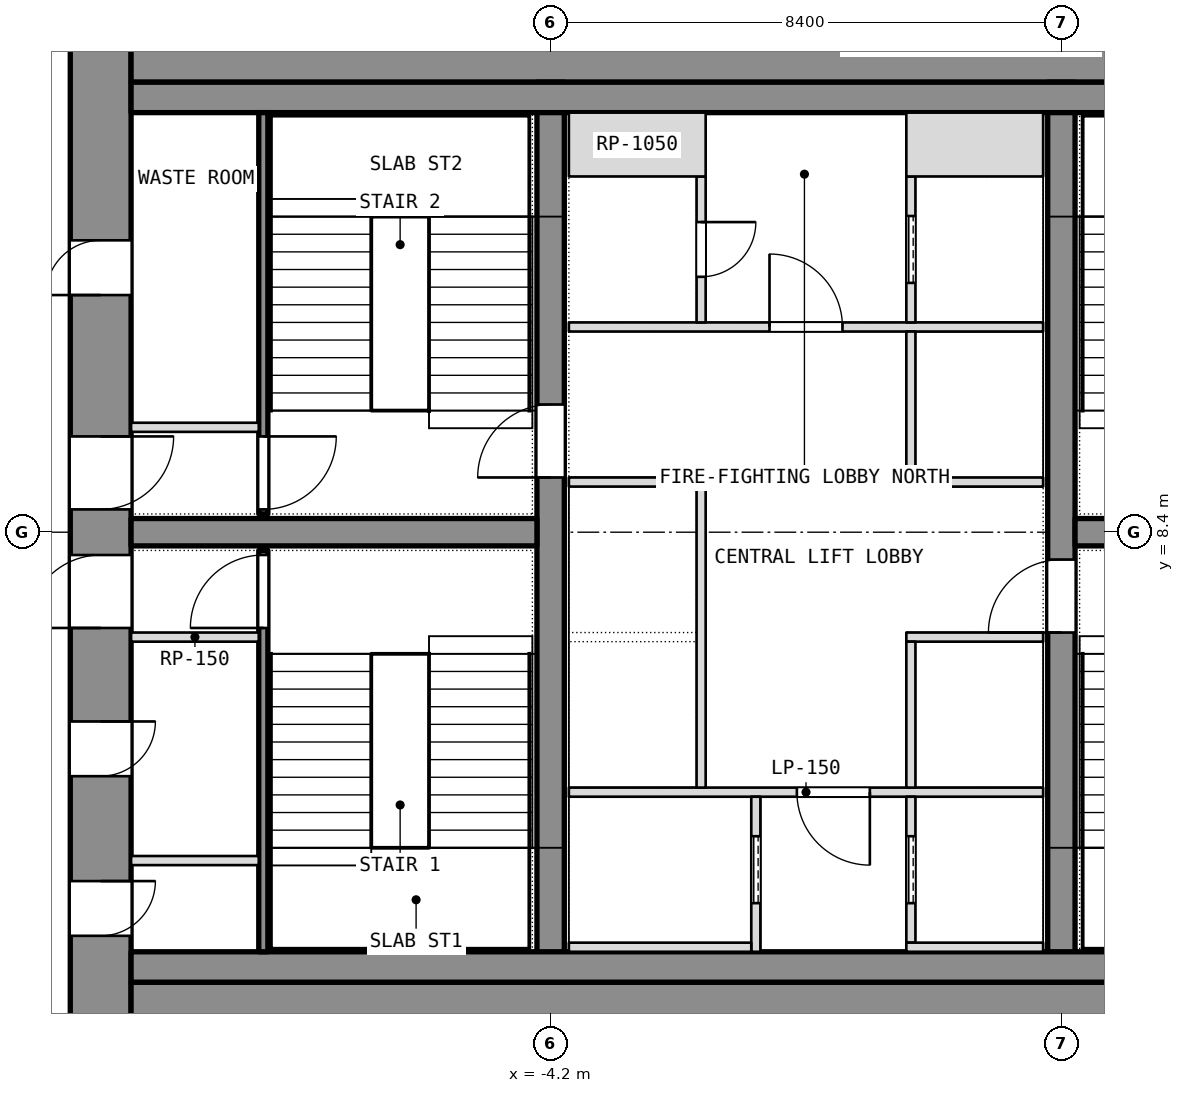
"""IFC4 building model, lengths in metres.
Left out: names, types, materials, properties, quantities, classifications, styles, units other than length and angle.
Written with IfcOpenShell. Run it as: python <this file> out.ifc"""

import sys

from ifc_helpers import new_model, si_unit, direction, frame, frame_2d, origin, place, context, subcontext, project, spatial, rectangle, extrude, element, fill, save


model = new_model("IFC4")
c1 = context("Model", 3, precision=1e-05, world=origin(), true_north=direction((0.0, 1.0)))
c2 = subcontext(c1, "Body", "Model", "MODEL_VIEW")
j1 = project(units=[si_unit("LENGTHUNIT", "METRE"), si_unit("PLANEANGLEUNIT", "RADIAN")], contexts=[c1])
p1 = place(None, origin())
s1 = spatial("IfcSite", under=j1, at=p1, CompositionType="ELEMENT")
p2 = place(p1, origin())
s2 = spatial("IfcBuilding", under=s1, at=p2, CompositionType="ELEMENT")
p3 = place(p2, frame((0.0, 0.0, 112.1)))
s3 = spatial("IfcBuildingStorey", under=s2, at=p3, CompositionType="ELEMENT", Elevation=112.1)
p4 = place(p3, frame((-11.6, 0.0, 0.0), z_axis=(0.0, 0.0, 1.0), x_axis=(0.0, 1.0, 0.0)))
e1 = element("IfcWall", 1, at=p4, inside=s3, PredefinedType="SHEAR", context=c2, shape_type="SweptSolid", body=[
    extrude(rectangle(XDim=16.8, YDim=1.0, at=frame_2d((8.4, 0.0))), origin(), (0.0, 0.0, 1.0), 3.6),
])
p5 = place(p4, frame((1.762, 0.0, 0.0)))
e2 = element("IfcOpeningElement", 2, at=p5, cuts=e1, PredefinedType="OPENING", context=c2, shape_type="SweptSolid", body=[
    extrude(rectangle(XDim=0.9, YDim=2.1, at=frame_2d((0.45, 1.05))), frame((0.0, 0.5, 0.0), z_axis=(0.0, -1.0, 0.0), x_axis=(1.0, 0.0, 0.0)), (0.0, 0.0, 1.0), 1.0),
])
p6 = place(p4, frame((4.387, 0.0, 0.0)))
e3 = element("IfcOpeningElement", 3, at=p6, cuts=e1, PredefinedType="OPENING", context=c2, shape_type="SweptSolid", body=[
    extrude(rectangle(XDim=0.9, YDim=2.1, at=frame_2d((0.45, 1.05))), frame((0.0, 0.5, 0.0), z_axis=(0.0, -1.0, 0.0), x_axis=(1.0, 0.0, 0.0)), (0.0, 0.0, 1.0), 1.0),
])
p7 = place(p4, frame((6.825, 0.0, 0.0)))
e4 = element("IfcOpeningElement", 4, at=p7, cuts=e1, PredefinedType="OPENING", context=c2, shape_type="SweptSolid", body=[
    extrude(rectangle(XDim=1.2, YDim=2.1, at=frame_2d((0.6, 1.05))), frame((0.0, 0.5, 0.0), z_axis=(0.0, -1.0, 0.0), x_axis=(1.0, 0.0, 0.0)), (0.0, 0.0, 1.0), 1.0),
])
p8 = place(p4, frame((12.3, 0.0, 0.0)))
e5 = element("IfcOpeningElement", 5, at=p8, cuts=e1, PredefinedType="OPENING", context=c2, shape_type="SweptSolid", body=[
    extrude(rectangle(XDim=0.9, YDim=2.1, at=frame_2d((0.45, 1.05))), frame((0.0, 0.5, 0.0), z_axis=(0.0, -1.0, 0.0), x_axis=(1.0, 0.0, 0.0)), (0.0, 0.0, 1.0), 1.0),
])
p9 = place(p4, frame((8.775, 0.0, 0.0)))
e6 = element("IfcOpeningElement", 6, at=p9, cuts=e1, PredefinedType="OPENING", context=c2, shape_type="SweptSolid", body=[
    extrude(rectangle(XDim=1.2, YDim=2.1, at=frame_2d((0.6, 1.05))), frame((0.0, 0.5, 0.0), z_axis=(0.0, -1.0, 0.0), x_axis=(1.0, 0.0, 0.0)), (0.0, 0.0, 1.0), 1.0),
])
for number, where, z_axis, x_axis in (
    (7, (-11.1, 0.5, 0.0), (0.0, 0.0, 1.0), (1.0, 0.0, 0.0)),
    (8, (-11.1, 16.3, 0.0), (0.0, 0.0, 1.0), (1.0, 0.0, 0.0)),
):
    element("IfcWall", number, at=place(p3, frame(where, z_axis=z_axis, x_axis=x_axis)), inside=s3, PredefinedType="SHEAR", context=c2, shape_type="SweptSolid", body=[
        extrude(rectangle(XDim=22.2, YDim=1.0, at=frame_2d((11.1, 0.0))), origin(), (0.0, 0.0, 1.0), 3.6),
    ])
p10 = place(p3, frame((-4.2, 1.0, 0.0), z_axis=(0.0, 0.0, 1.0), x_axis=(0.0, 1.0, 0.0)))
e9 = element("IfcWall", 9, at=p10, inside=s3, PredefinedType="SHEAR", context=c2, shape_type="SweptSolid", body=[
    extrude(rectangle(XDim=14.8, YDim=0.45, at=frame_2d((7.4, 0.0))), origin(), (0.0, 0.0, 1.0), 3.6),
])
p11 = place(p10, frame((8.3, 0.0, 0.0)))
e10 = element("IfcOpeningElement", 10, at=p11, cuts=e9, PredefinedType="OPENING", context=c2, shape_type="SweptSolid", body=[
    extrude(rectangle(XDim=1.2, YDim=2.1, at=frame_2d((0.6, 1.05))), frame((0.0, 0.225, 0.0), z_axis=(0.0, -1.0, 0.0), x_axis=(1.0, 0.0, 0.0)), (0.0, 0.0, 1.0), 0.45),
])
p12 = place(p3, frame((4.2, 1.0, 0.0), z_axis=(0.0, 0.0, 1.0), x_axis=(0.0, 1.0, 0.0)))
e11 = element("IfcWall", 11, at=p12, inside=s3, PredefinedType="SHEAR", context=c2, shape_type="SweptSolid", body=[
    extrude(rectangle(XDim=14.8, YDim=0.45, at=frame_2d((7.4, 0.0))), origin(), (0.0, 0.0, 1.0), 3.6),
])
p13 = place(p12, frame((5.75, 0.0, 0.0)))
e12 = element("IfcOpeningElement", 12, at=p13, cuts=e11, PredefinedType="OPENING", context=c2, shape_type="SweptSolid", body=[
    extrude(rectangle(XDim=1.2, YDim=2.1, at=frame_2d((0.6, 1.05))), frame((0.0, 0.225, 0.0), z_axis=(0.0, -1.0, 0.0), x_axis=(1.0, 0.0, 0.0)), (0.0, 0.0, 1.0), 0.45),
])
for number, where, z_axis, x_axis in (
    (13, (-11.1, 8.4, 0.0), (0.0, 0.0, 1.0), (1.0, 0.0, 0.0)),
    (14, (4.425, 8.4, 0.0), (0.0, 0.0, 1.0), (1.0, 0.0, 0.0)),
):
    element("IfcWall", number, at=place(p3, frame(where, z_axis=z_axis, x_axis=x_axis)), inside=s3, PredefinedType="SHEAR", context=c2, shape_type="SweptSolid", body=[
        extrude(rectangle(XDim=6.675, YDim=0.45, at=frame_2d((3.337, 0.0))), origin(), (0.0, 0.0, 1.0), 3.6),
    ])
for number, where, z_axis, x_axis in (
    (15, (-11.1, 1.25, 0.0), (0.0, 0.0, 1.0), (1.0, 0.0, 0.0)),
    (16, (-11.1, 15.55, 0.0), (0.0, 0.0, 1.0), (1.0, 0.0, 0.0)),
):
    element("IfcWall", number, at=place(p3, frame(where, z_axis=z_axis, x_axis=x_axis)), inside=s3, PredefinedType="PARTITIONING", context=c2, shape_type="SweptSolid", body=[
        extrude(rectangle(XDim=22.2, YDim=0.5, at=frame_2d((11.1, 0.0))), origin(), (0.0, 0.0, 1.0), 3.34),
    ])
p14 = place(p3, frame((-8.925, 1.5, 0.0), z_axis=(0.0, 0.0, 1.0), x_axis=(0.0, 1.0, 0.0)))
e17 = element("IfcWall", 17, at=p14, inside=s3, PredefinedType="SHEAR", context=c2, shape_type="SweptSolid", body=[
    extrude(rectangle(XDim=6.6, YDim=0.15, at=frame_2d((3.3, 0.0))), origin(), (0.0, 0.0, 1.0), 3.34),
])
p15 = place(p14, frame((5.325, 0.0, 0.0)))
e18 = element("IfcOpeningElement", 18, at=p15, cuts=e17, PredefinedType="OPENING", context=c2, shape_type="SweptSolid", body=[
    extrude(rectangle(XDim=1.2, YDim=2.1, at=frame_2d((0.6, 1.05))), frame((0.0, 0.075, 0.0), z_axis=(0.0, -1.0, 0.0), x_axis=(1.0, 0.0, 0.0)), (0.0, 0.0, 1.0), 0.15),
])
for number, where, z_axis, x_axis in (
    (19, (-11.1, 6.675, 0.0), (0.0, 0.0, 1.0), (1.0, 0.0, 0.0)),
    (20, (-11.1, 3.0, 0.0), (0.0, 0.0, 1.0), (1.0, 0.0, 0.0)),
):
    element("IfcWall", number, at=place(p3, frame(where, z_axis=z_axis, x_axis=x_axis)), inside=s3, PredefinedType="PARTITIONING", context=c2, shape_type="SweptSolid", body=[
        extrude(rectangle(XDim=2.1, YDim=0.15, at=frame_2d((1.05, 0.0))), origin(), (0.0, 0.0, 1.0), 3.34),
    ])
p16 = place(p3, frame((-8.925, 8.7, 0.0), z_axis=(0.0, 0.0, 1.0), x_axis=(0.0, 1.0, 0.0)))
e21 = element("IfcWall", 21, at=p16, inside=s3, PredefinedType="SHEAR", context=c2, shape_type="SweptSolid", body=[
    extrude(rectangle(XDim=6.6, YDim=0.15, at=frame_2d((3.3, 0.0))), origin(), (0.0, 0.0, 1.0), 3.34),
])
p17 = place(p16, frame((0.075, 0.0, 0.0)))
e22 = element("IfcOpeningElement", 22, at=p17, cuts=e21, PredefinedType="OPENING", context=c2, shape_type="SweptSolid", body=[
    extrude(rectangle(XDim=1.2, YDim=2.1, at=frame_2d((0.6, 1.05))), frame((0.0, 0.075, 0.0), z_axis=(0.0, -1.0, 0.0), x_axis=(1.0, 0.0, 0.0)), (0.0, 0.0, 1.0), 0.15),
])
p18 = place(p3, frame((-11.1, 10.125, 0.0), z_axis=(0.0, 0.0, 1.0), x_axis=(1.0, 0.0, 0.0)))
e23 = element("IfcWall", 23, at=p18, inside=s3, PredefinedType="PARTITIONING", context=c2, shape_type="SweptSolid", body=[
    extrude(rectangle(XDim=2.1, YDim=0.15, at=frame_2d((1.05, 0.0))), origin(), (0.0, 0.0, 1.0), 3.34),
])
p19 = place(p3, frame((-3.9, 4.125, 0.0), z_axis=(0.0, 0.0, 1.0), x_axis=(1.0, 0.0, 0.0)))
e24 = element("IfcWall", 24, at=p19, inside=s3, PredefinedType="PARTITIONING", context=c2, shape_type="SweptSolid", body=[
    extrude(rectangle(XDim=7.8, YDim=0.15, at=frame_2d((3.9, 0.0))), origin(), (0.0, 0.0, 1.0), 3.34),
])
p20 = place(p19, frame((3.75, 0.0, 0.0)))
e25 = element("IfcOpeningElement", 25, at=p20, cuts=e24, PredefinedType="OPENING", context=c2, shape_type="SweptSolid", body=[
    extrude(rectangle(XDim=1.2, YDim=2.1, at=frame_2d((0.6, 1.05))), frame((0.0, 0.075, 0.0), z_axis=(0.0, -1.0, 0.0), x_axis=(1.0, 0.0, 0.0)), (0.0, 0.0, 1.0), 0.15),
])
p21 = place(p3, frame((-3.9, 11.775, 0.0), z_axis=(0.0, 0.0, 1.0), x_axis=(1.0, 0.0, 0.0)))
e26 = element("IfcWall", 26, at=p21, inside=s3, PredefinedType="PARTITIONING", context=c2, shape_type="SweptSolid", body=[
    extrude(rectangle(XDim=7.8, YDim=0.15, at=frame_2d((3.9, 0.0))), origin(), (0.0, 0.0, 1.0), 3.34),
])
p22 = place(p21, frame((3.3, 0.0, 0.0)))
e27 = element("IfcOpeningElement", 27, at=p22, cuts=e26, PredefinedType="OPENING", context=c2, shape_type="SweptSolid", body=[
    extrude(rectangle(XDim=1.2, YDim=2.1, at=frame_2d((0.6, 1.05))), frame((0.0, 0.075, 0.0), z_axis=(0.0, -1.0, 0.0), x_axis=(1.0, 0.0, 0.0)), (0.0, 0.0, 1.0), 0.15),
])
p23 = place(p3, frame((-0.825, 1.5, 0.0), z_axis=(0.0, 0.0, 1.0), x_axis=(0.0, 1.0, 0.0)))
e28 = element("IfcWall", 28, at=p23, inside=s3, PredefinedType="SHEAR", context=c2, shape_type="SweptSolid", body=[
    extrude(rectangle(XDim=2.55, YDim=0.15, at=frame_2d((1.275, 0.0))), origin(), (0.0, 0.0, 1.0), 3.6),
])
p24 = place(p23, frame((0.8, 0.0, 0.0)))
e29 = element("IfcOpeningElement", 29, at=p24, cuts=e28, PredefinedType="OPENING", context=c2, shape_type="SweptSolid", body=[
    extrude(rectangle(XDim=1.1, YDim=2.1, at=frame_2d((0.55, 1.05))), frame((0.0, 0.075, 0.0), z_axis=(0.0, -1.0, 0.0), x_axis=(1.0, 0.0, 0.0)), (0.0, 0.0, 1.0), 0.15),
])
p25 = place(p3, frame((-3.9, 1.575, 0.0), z_axis=(0.0, 0.0, 1.0), x_axis=(1.0, 0.0, 0.0)))
e30 = element("IfcWall", 30, at=p25, inside=s3, PredefinedType="SHEAR", context=c2, shape_type="SweptSolid", body=[
    extrude(rectangle(XDim=3.0, YDim=0.15, at=frame_2d((1.5, 0.0))), origin(), (0.0, 0.0, 1.0), 3.6),
])
p26 = place(p3, frame((-1.725, 4.2, 0.0), z_axis=(0.0, 0.0, 1.0), x_axis=(0.0, 1.0, 0.0)))
e31 = element("IfcWall", 31, at=p26, inside=s3, PredefinedType="SHEAR", context=c2, shape_type="SweptSolid", body=[
    extrude(rectangle(XDim=4.95, YDim=0.15, at=frame_2d((2.475, 0.0))), origin(), (0.0, 0.0, 1.0), 3.6),
])
p27 = place(p3, frame((-3.9, 9.225, 0.0), z_axis=(0.0, 0.0, 1.0), x_axis=(1.0, 0.0, 0.0)))
e32 = element("IfcWall", 32, at=p27, inside=s3, PredefinedType="SHEAR", context=c2, shape_type="SweptSolid", body=[
    extrude(rectangle(XDim=2.25, YDim=0.15, at=frame_2d((1.125, 0.0))), origin(), (0.0, 0.0, 1.0), 3.6),
])
p28 = place(p3, frame((-1.725, 11.85, 0.0), z_axis=(0.0, 0.0, 1.0), x_axis=(0.0, 1.0, 0.0)))
e33 = element("IfcWall", 33, at=p28, inside=s3, PredefinedType="PARTITIONING", context=c2, shape_type="SweptSolid", body=[
    extrude(rectangle(XDim=2.4, YDim=0.15, at=frame_2d((1.2, 0.0))), origin(), (0.0, 0.0, 1.0), 3.34),
])
p29 = place(p28, frame((0.75, 0.0, 0.0)))
e34 = element("IfcOpeningElement", 34, at=p29, cuts=e33, PredefinedType="OPENING", context=c2, shape_type="SweptSolid", body=[
    extrude(rectangle(XDim=0.9, YDim=2.1, at=frame_2d((0.45, 1.05))), frame((0.0, 0.075, 0.0), z_axis=(0.0, -1.0, 0.0), x_axis=(1.0, 0.0, 0.0)), (0.0, 0.0, 1.0), 0.15),
])
p30 = place(p3, frame((-3.9, 14.775, 0.0), z_axis=(0.0, 0.0, 1.0), x_axis=(1.0, 0.0, 0.0)))
e35 = element("IfcWall", 35, at=p30, inside=s3, PredefinedType="PARTITIONING", context=c2, shape_type="SweptSolid", body=[
    extrude(rectangle(XDim=2.25, YDim=1.05, at=frame_2d((1.125, 0.0))), origin(), (0.0, 0.0, 1.0), 3.34),
])
p31 = place(p3, frame((1.725, 1.65, 0.0), z_axis=(0.0, 0.0, 1.0), x_axis=(0.0, 1.0, 0.0)))
e36 = element("IfcWall", 36, at=p31, inside=s3, PredefinedType="SHEAR", context=c2, shape_type="SweptSolid", body=[
    extrude(rectangle(XDim=2.4, YDim=0.15, at=frame_2d((1.2, 0.0))), origin(), (0.0, 0.0, 1.0), 3.6),
])
p32 = place(p31, frame((0.65, 0.0, 0.0)))
e37 = element("IfcOpeningElement", 37, at=p32, cuts=e36, PredefinedType="OPENING", context=c2, shape_type="SweptSolid", body=[
    extrude(rectangle(XDim=1.1, YDim=2.1, at=frame_2d((0.55, 1.05))), frame((0.0, 0.075, 0.0), z_axis=(0.0, -1.0, 0.0), x_axis=(1.0, 0.0, 0.0)), (0.0, 0.0, 1.0), 0.15),
])
p33 = place(p3, frame((1.65, 1.575, 0.0), z_axis=(0.0, 0.0, 1.0), x_axis=(1.0, 0.0, 0.0)))
e38 = element("IfcWall", 38, at=p33, inside=s3, PredefinedType="SHEAR", context=c2, shape_type="SweptSolid", body=[
    extrude(rectangle(XDim=2.25, YDim=0.15, at=frame_2d((1.125, 0.0))), origin(), (0.0, 0.0, 1.0), 3.6),
])
p34 = place(p3, frame((1.725, 11.85, 0.0), z_axis=(0.0, 0.0, 1.0), x_axis=(0.0, 1.0, 0.0)))
e39 = element("IfcWall", 39, at=p34, inside=s3, PredefinedType="SHEAR", context=c2, shape_type="SweptSolid", body=[
    extrude(rectangle(XDim=2.4, YDim=0.15, at=frame_2d((1.2, 0.0))), origin(), (0.0, 0.0, 1.0), 3.6),
])
p35 = place(p34, frame((0.65, 0.0, 0.0)))
e40 = element("IfcOpeningElement", 40, at=p35, cuts=e39, PredefinedType="OPENING", context=c2, shape_type="SweptSolid", body=[
    extrude(rectangle(XDim=1.1, YDim=2.1, at=frame_2d((0.55, 1.05))), frame((0.0, 0.075, 0.0), z_axis=(0.0, -1.0, 0.0), x_axis=(1.0, 0.0, 0.0)), (0.0, 0.0, 1.0), 0.15),
])
p36 = place(p3, frame((1.65, 14.775, 0.0), z_axis=(0.0, 0.0, 1.0), x_axis=(1.0, 0.0, 0.0)))
e41 = element("IfcWall", 41, at=p36, inside=s3, PredefinedType="SHEAR", context=c2, shape_type="SweptSolid", body=[
    extrude(rectangle(XDim=2.25, YDim=1.05, at=frame_2d((1.125, 0.0))), origin(), (0.0, 0.0, 1.0), 3.6),
])
for number, where, z_axis, x_axis in (
    (42, (1.65, 6.675, 0.0), (0.0, 0.0, 1.0), (1.0, 0.0, 0.0)),
    (43, (1.65, 9.225, 0.0), (0.0, 0.0, 1.0), (1.0, 0.0, 0.0)),
):
    element("IfcWall", number, at=place(p3, frame(where, z_axis=z_axis, x_axis=x_axis)), inside=s3, PredefinedType="SHEAR", context=c2, shape_type="SweptSolid", body=[
        extrude(rectangle(XDim=2.25, YDim=0.15, at=frame_2d((1.125, 0.0))), origin(), (0.0, 0.0, 1.0), 3.6),
    ])
p37 = place(p3, frame((1.725, 4.2, 0.0), z_axis=(0.0, 0.0, 1.0), x_axis=(0.0, 1.0, 0.0)))
e44 = element("IfcWall", 44, at=p37, inside=s3, PredefinedType="SHEAR", context=c2, shape_type="SweptSolid", body=[
    extrude(rectangle(XDim=2.4, YDim=0.15, at=frame_2d((1.2, 0.0))), origin(), (0.0, 0.0, 1.0), 3.6),
])
p38 = place(p3, frame((1.725, 9.3, 0.0), z_axis=(0.0, 0.0, 1.0), x_axis=(0.0, 1.0, 0.0)))
e45 = element("IfcWall", 45, at=p38, inside=s3, PredefinedType="SHEAR", context=c2, shape_type="SweptSolid", body=[
    extrude(rectangle(XDim=2.4, YDim=0.15, at=frame_2d((1.2, 0.0))), origin(), (0.0, 0.0, 1.0), 3.6),
])
p39 = place(p5, origin())
e46 = element("IfcDoor", 46, at=p39, inside=s3, OperationType="SINGLE_SWING_LEFT", PredefinedType="DOOR", context=c2, shape_type="SweptSolid", body=[
    extrude(rectangle(XDim=0.9, YDim=2.1, at=frame_2d((0.45, 1.05))), frame((0.0, 0.025, 0.0), z_axis=(0.0, -1.0, 0.0), x_axis=(1.0, 0.0, 0.0)), (0.0, 0.0, 1.0), 0.05),
])
fill(e2, e46)
p40 = place(p6, origin())
e47 = element("IfcDoor", 47, at=p40, inside=s3, OperationType="SINGLE_SWING_LEFT", PredefinedType="DOOR", context=c2, shape_type="SweptSolid", body=[
    extrude(rectangle(XDim=0.9, YDim=2.1, at=frame_2d((0.45, 1.05))), frame((0.0, 0.025, 0.0), z_axis=(0.0, -1.0, 0.0), x_axis=(1.0, 0.0, 0.0)), (0.0, 0.0, 1.0), 0.05),
])
fill(e3, e47)
p41 = place(p7, origin())
e48 = element("IfcDoor", 48, at=p41, inside=s3, OperationType="SINGLE_SWING_LEFT", PredefinedType="DOOR", context=c2, shape_type="SweptSolid", body=[
    extrude(rectangle(XDim=1.2, YDim=2.1, at=frame_2d((0.6, 1.05))), frame((0.0, 0.025, 0.0), z_axis=(0.0, -1.0, 0.0), x_axis=(1.0, 0.0, 0.0)), (0.0, 0.0, 1.0), 0.05),
])
fill(e4, e48)
p42 = place(p15, origin())
e49 = element("IfcDoor", 49, at=p42, inside=s3, OperationType="SINGLE_SWING_LEFT", PredefinedType="DOOR", context=c2, shape_type="SweptSolid", body=[
    extrude(rectangle(XDim=1.2, YDim=2.1, at=frame_2d((0.6, 1.05))), frame((0.0, 0.025, 0.0), z_axis=(0.0, -1.0, 0.0), x_axis=(1.0, 0.0, 0.0)), (0.0, 0.0, 1.0), 0.05),
])
fill(e18, e49)
p43 = place(p8, origin())
e50 = element("IfcDoor", 50, at=p43, inside=s3, OperationType="SINGLE_SWING_LEFT", PredefinedType="DOOR", context=c2, shape_type="SweptSolid", body=[
    extrude(rectangle(XDim=0.9, YDim=2.1, at=frame_2d((0.45, 1.05))), frame((0.0, 0.025, 0.0), z_axis=(0.0, -1.0, 0.0), x_axis=(1.0, 0.0, 0.0)), (0.0, 0.0, 1.0), 0.05),
])
fill(e5, e50)
p44 = place(p9, origin())
e51 = element("IfcDoor", 51, at=p44, inside=s3, OperationType="SINGLE_SWING_LEFT", PredefinedType="DOOR", context=c2, shape_type="SweptSolid", body=[
    extrude(rectangle(XDim=1.2, YDim=2.1, at=frame_2d((0.6, 1.05))), frame((0.0, 0.025, 0.0), z_axis=(0.0, -1.0, 0.0), x_axis=(1.0, 0.0, 0.0)), (0.0, 0.0, 1.0), 0.05),
])
fill(e6, e51)
p45 = place(p17, origin())
e52 = element("IfcDoor", 52, at=p45, inside=s3, OperationType="SINGLE_SWING_LEFT", PredefinedType="DOOR", context=c2, shape_type="SweptSolid", body=[
    extrude(rectangle(XDim=1.2, YDim=2.1, at=frame_2d((0.6, 1.05))), frame((0.0, 0.025, 0.0), z_axis=(0.0, -1.0, 0.0), x_axis=(1.0, 0.0, 0.0)), (0.0, 0.0, 1.0), 0.05),
])
fill(e22, e52)
p46 = place(p24, origin())
e53 = element("IfcDoor", 53, at=p46, inside=s3, OperationType="SLIDING_TO_LEFT", PredefinedType="DOOR", context=c2, shape_type="SweptSolid", body=[
    extrude(rectangle(XDim=1.1, YDim=2.1, at=frame_2d((0.55, 1.05))), frame((0.0, 0.025, 0.0), z_axis=(0.0, -1.0, 0.0), x_axis=(1.0, 0.0, 0.0)), (0.0, 0.0, 1.0), 0.05),
])
fill(e29, e53)
p47 = place(p32, origin())
e54 = element("IfcDoor", 54, at=p47, inside=s3, OperationType="SLIDING_TO_LEFT", PredefinedType="DOOR", context=c2, shape_type="SweptSolid", body=[
    extrude(rectangle(XDim=1.1, YDim=2.1, at=frame_2d((0.55, 1.05))), frame((0.0, 0.025, 0.0), z_axis=(0.0, -1.0, 0.0), x_axis=(1.0, 0.0, 0.0)), (0.0, 0.0, 1.0), 0.05),
])
fill(e37, e54)
p48 = place(p35, origin())
e55 = element("IfcDoor", 55, at=p48, inside=s3, OperationType="SLIDING_TO_LEFT", PredefinedType="DOOR", context=c2, shape_type="SweptSolid", body=[
    extrude(rectangle(XDim=1.1, YDim=2.1, at=frame_2d((0.55, 1.05))), frame((0.0, 0.025, 0.0), z_axis=(0.0, -1.0, 0.0), x_axis=(1.0, 0.0, 0.0)), (0.0, 0.0, 1.0), 0.05),
])
fill(e40, e55)
p49 = place(p20, origin())
e56 = element("IfcDoor", 56, at=p49, inside=s3, OperationType="SINGLE_SWING_LEFT", PredefinedType="DOOR", context=c2, shape_type="SweptSolid", body=[
    extrude(rectangle(XDim=1.2, YDim=2.1, at=frame_2d((0.6, 1.05))), frame((0.0, 0.025, 0.0), z_axis=(0.0, -1.0, 0.0), x_axis=(1.0, 0.0, 0.0)), (0.0, 0.0, 1.0), 0.05),
])
fill(e25, e56)
p50 = place(p22, origin())
e57 = element("IfcDoor", 57, at=p50, inside=s3, OperationType="SINGLE_SWING_LEFT", PredefinedType="DOOR", context=c2, shape_type="SweptSolid", body=[
    extrude(rectangle(XDim=1.2, YDim=2.1, at=frame_2d((0.6, 1.05))), frame((0.0, 0.025, 0.0), z_axis=(0.0, -1.0, 0.0), x_axis=(1.0, 0.0, 0.0)), (0.0, 0.0, 1.0), 0.05),
])
fill(e27, e57)
p51 = place(p29, origin())
e58 = element("IfcDoor", 58, at=p51, inside=s3, OperationType="SINGLE_SWING_LEFT", PredefinedType="DOOR", context=c2, shape_type="SweptSolid", body=[
    extrude(rectangle(XDim=0.9, YDim=2.1, at=frame_2d((0.45, 1.05))), frame((0.0, 0.025, 0.0), z_axis=(0.0, -1.0, 0.0), x_axis=(1.0, 0.0, 0.0)), (0.0, 0.0, 1.0), 0.05),
])
fill(e34, e58)
p52 = place(p11, origin())
e59 = element("IfcDoor", 59, at=p52, inside=s3, OperationType="SINGLE_SWING_LEFT", PredefinedType="DOOR", context=c2, shape_type="SweptSolid", body=[
    extrude(rectangle(XDim=1.2, YDim=2.1, at=frame_2d((0.6, 1.05))), frame((0.0, 0.025, 0.0), z_axis=(0.0, -1.0, 0.0), x_axis=(1.0, 0.0, 0.0)), (0.0, 0.0, 1.0), 0.05),
])
fill(e10, e59)
p53 = place(p13, origin())
e60 = element("IfcDoor", 60, at=p53, inside=s3, OperationType="SINGLE_SWING_LEFT", PredefinedType="DOOR", context=c2, shape_type="SweptSolid", body=[
    extrude(rectangle(XDim=1.2, YDim=2.1, at=frame_2d((0.6, 1.05))), frame((0.0, 0.025, 0.0), z_axis=(0.0, -1.0, 0.0), x_axis=(1.0, 0.0, 0.0)), (0.0, 0.0, 1.0), 0.05),
])
fill(e12, e60)
save(model, sys.argv[1])
